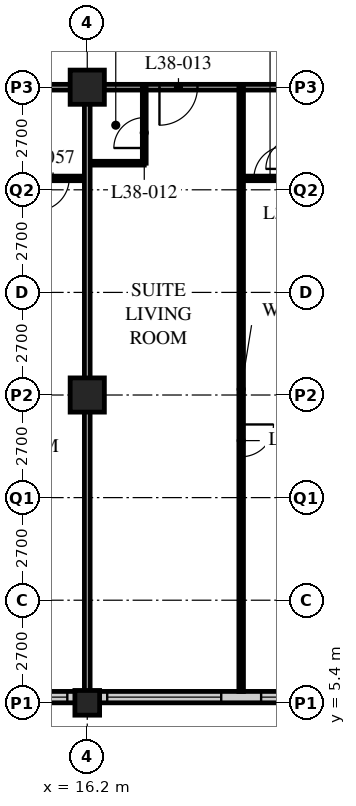
"""IFC4 building model, lengths in metres.
Left out: names, types, materials, properties, quantities, classifications, styles, units other than length and angle.
Written with IfcOpenShell. Run it as: python <this file> out.ifc"""

import sys

from ifc_helpers import new_model, si_unit, direction, frame, frame_2d, origin, origin_2d, place, context, subcontext, project, spatial, rectangle, hollow_rectangle, extrude, element, fill, save


model = new_model("IFC4")
c1 = context("Model", 3, precision=1e-05, world=origin(), true_north=direction((0.0, 1.0)))
c2 = subcontext(c1, "Body", "Model", "MODEL_VIEW")
j1 = project(units=[si_unit("LENGTHUNIT", "METRE"), si_unit("PLANEANGLEUNIT", "RADIAN")], contexts=[c1])
p1 = place(None, origin())
s1 = spatial("IfcSite", under=j1, at=p1, CompositionType="ELEMENT")
p2 = place(p1, origin())
s2 = spatial("IfcBuilding", under=s1, at=p2, CompositionType="ELEMENT")
p3 = place(p2, frame((0.0, 0.0, 147.6)))
s3 = spatial("IfcBuildingStorey", under=s2, at=p3, CompositionType="ELEMENT", Elevation=147.6)
p4 = place(p3, frame((16.2, 5.4, 0.0), z_axis=(0.0, 0.0, 1.0), x_axis=(1.0, 0.0, 0.0)))
e1 = element("IfcColumn", 1, at=p4, inside=s3, PredefinedType="COLUMN", context=c2, shape_type="SweptSolid", body=[
    extrude(hollow_rectangle(XDim=0.65, YDim=0.65, WallThickness=0.055, at=origin_2d()), origin(), (0.0, 0.0, 1.0), 3.4),
])
for number, where, z_axis, x_axis in (
    (2, (16.2, 13.5, 0.0), (0.0, 0.0, 1.0), (1.0, 0.0, 0.0)),
    (3, (16.2, 21.6, 0.0), (0.0, 0.0, 1.0), (1.0, 0.0, 0.0)),
):
    element("IfcColumn", number, at=place(p3, frame(where, z_axis=z_axis, x_axis=x_axis)), inside=s3, PredefinedType="COLUMN", context=c2, shape_type="SweptSolid", body=[
        extrude(hollow_rectangle(XDim=0.9, YDim=0.9, WallThickness=0.1, at=origin_2d()), origin(), (0.0, 0.0, 1.0), 3.4),
    ])
p5 = place(p3, frame((8.4, 5.55, 0.0), z_axis=(0.0, 0.0, 1.0), x_axis=(1.0, 0.0, 0.0)))
e4 = element("IfcWall", 4, at=p5, inside=s3, PredefinedType="SOLIDWALL", context=c2, shape_type="SweptSolid", body=[
    extrude(rectangle(XDim=40.2, YDim=0.3, at=frame_2d((20.1, 0.0))), origin(), (0.0, 0.0, 1.0), 3.19),
])
p6 = place(p5, frame((0.225, 0.0, 0.9)))
e5 = element("IfcOpeningElement", 5, at=p6, cuts=e4, PredefinedType="OPENING", context=c2, shape_type="SweptSolid", body=[
    extrude(rectangle(XDim=3.0, YDim=1.4, at=frame_2d((1.5, 0.7))), frame((0.0, 0.16, 0.0), z_axis=(0.0, -1.0, 0.0), x_axis=(1.0, 0.0, 0.0)), (0.0, 0.0, 1.0), 0.32),
])
p7 = place(p5, frame((4.275, 0.0, 0.9)))
e6 = element("IfcOpeningElement", 6, at=p7, cuts=e4, PredefinedType="OPENING", context=c2, shape_type="SweptSolid", body=[
    extrude(rectangle(XDim=3.0, YDim=1.4, at=frame_2d((1.5, 0.7))), frame((0.0, 0.16, 0.0), z_axis=(0.0, -1.0, 0.0), x_axis=(1.0, 0.0, 0.0)), (0.0, 0.0, 1.0), 0.32),
])
p8 = place(p5, frame((8.325, 0.0, 0.9)))
e7 = element("IfcOpeningElement", 7, at=p8, cuts=e4, PredefinedType="OPENING", context=c2, shape_type="SweptSolid", body=[
    extrude(rectangle(XDim=3.0, YDim=1.4, at=frame_2d((1.5, 0.7))), frame((0.0, 0.16, 0.0), z_axis=(0.0, -1.0, 0.0), x_axis=(1.0, 0.0, 0.0)), (0.0, 0.0, 1.0), 0.32),
])
p9 = place(p5, frame((12.375, 0.0, 0.9)))
e8 = element("IfcOpeningElement", 8, at=p9, cuts=e4, PredefinedType="OPENING", context=c2, shape_type="SweptSolid", body=[
    extrude(rectangle(XDim=3.0, YDim=1.4, at=frame_2d((1.5, 0.7))), frame((0.0, 0.16, 0.0), z_axis=(0.0, -1.0, 0.0), x_axis=(1.0, 0.0, 0.0)), (0.0, 0.0, 1.0), 0.32),
])
p10 = place(p5, frame((16.425, 0.0, 0.9)))
e9 = element("IfcOpeningElement", 9, at=p10, cuts=e4, PredefinedType="OPENING", context=c2, shape_type="SweptSolid", body=[
    extrude(rectangle(XDim=3.0, YDim=1.4, at=frame_2d((1.5, 0.7))), frame((0.0, 0.16, 0.0), z_axis=(0.0, -1.0, 0.0), x_axis=(1.0, 0.0, 0.0)), (0.0, 0.0, 1.0), 0.32),
])
p11 = place(p5, frame((20.475, 0.0, 0.9)))
e10 = element("IfcOpeningElement", 10, at=p11, cuts=e4, PredefinedType="OPENING", context=c2, shape_type="SweptSolid", body=[
    extrude(rectangle(XDim=3.0, YDim=1.4, at=frame_2d((1.5, 0.7))), frame((0.0, 0.16, 0.0), z_axis=(0.0, -1.0, 0.0), x_axis=(1.0, 0.0, 0.0)), (0.0, 0.0, 1.0), 0.32),
])
p12 = place(p5, frame((24.525, 0.0, 0.9)))
e11 = element("IfcOpeningElement", 11, at=p12, cuts=e4, PredefinedType="OPENING", context=c2, shape_type="SweptSolid", body=[
    extrude(rectangle(XDim=3.0, YDim=1.4, at=frame_2d((1.5, 0.7))), frame((0.0, 0.16, 0.0), z_axis=(0.0, -1.0, 0.0), x_axis=(1.0, 0.0, 0.0)), (0.0, 0.0, 1.0), 0.32),
])
p13 = place(p5, frame((28.575, 0.0, 0.9)))
e12 = element("IfcOpeningElement", 12, at=p13, cuts=e4, PredefinedType="OPENING", context=c2, shape_type="SweptSolid", body=[
    extrude(rectangle(XDim=3.0, YDim=1.4, at=frame_2d((1.5, 0.7))), frame((0.0, 0.16, 0.0), z_axis=(0.0, -1.0, 0.0), x_axis=(1.0, 0.0, 0.0)), (0.0, 0.0, 1.0), 0.32),
])
p14 = place(p5, frame((32.625, 0.0, 0.9)))
e13 = element("IfcOpeningElement", 13, at=p14, cuts=e4, PredefinedType="OPENING", context=c2, shape_type="SweptSolid", body=[
    extrude(rectangle(XDim=3.0, YDim=1.4, at=frame_2d((1.5, 0.7))), frame((0.0, 0.16, 0.0), z_axis=(0.0, -1.0, 0.0), x_axis=(1.0, 0.0, 0.0)), (0.0, 0.0, 1.0), 0.32),
])
p15 = place(p5, frame((36.675, 0.0, 0.9)))
e14 = element("IfcOpeningElement", 14, at=p15, cuts=e4, PredefinedType="OPENING", context=c2, shape_type="SweptSolid", body=[
    extrude(rectangle(XDim=3.0, YDim=1.4, at=frame_2d((1.5, 0.7))), frame((0.0, 0.16, 0.0), z_axis=(0.0, -1.0, 0.0), x_axis=(1.0, 0.0, 0.0)), (0.0, 0.0, 1.0), 0.32),
])
p16 = place(p3, frame((12.15, 21.6, 0.0), z_axis=(0.0, 0.0, 1.0), x_axis=(1.0, 0.0, 0.0)))
e15 = element("IfcWall", 15, at=p16, inside=s3, PredefinedType="PARTITIONING", context=c2, shape_type="SweptSolid", body=[
    extrude(rectangle(XDim=36.45, YDim=0.15, at=frame_2d((18.225, 0.0))), origin(), (0.0, 0.0, 1.0), 2.42),
])
p17 = place(p16, frame((5.95, 0.0, 0.0)))
e16 = element("IfcOpeningElement", 16, at=p17, cuts=e15, PredefinedType="OPENING", context=c2, shape_type="SweptSolid", body=[
    extrude(rectangle(XDim=1.0, YDim=2.1, at=frame_2d((0.5, 1.05))), frame((0.0, 0.085, 0.0), z_axis=(0.0, -1.0, 0.0), x_axis=(1.0, 0.0, 0.0)), (0.0, 0.0, 1.0), 0.17),
])
p18 = place(p16, frame((14.05, 0.0, 0.0)))
e17 = element("IfcOpeningElement", 17, at=p18, cuts=e15, PredefinedType="OPENING", context=c2, shape_type="SweptSolid", body=[
    extrude(rectangle(XDim=1.0, YDim=2.1, at=frame_2d((0.5, 1.05))), frame((0.0, 0.085, 0.0), z_axis=(0.0, -1.0, 0.0), x_axis=(1.0, 0.0, 0.0)), (0.0, 0.0, 1.0), 0.17),
])
p19 = place(p16, frame((22.15, 0.0, 0.0)))
e18 = element("IfcOpeningElement", 18, at=p19, cuts=e15, PredefinedType="OPENING", context=c2, shape_type="SweptSolid", body=[
    extrude(rectangle(XDim=1.0, YDim=2.1, at=frame_2d((0.5, 1.05))), frame((0.0, 0.085, 0.0), z_axis=(0.0, -1.0, 0.0), x_axis=(1.0, 0.0, 0.0)), (0.0, 0.0, 1.0), 0.17),
])
p20 = place(p16, frame((30.8, 0.0, 0.0)))
e19 = element("IfcOpeningElement", 19, at=p20, cuts=e15, PredefinedType="OPENING", context=c2, shape_type="SweptSolid", body=[
    extrude(rectangle(XDim=1.0, YDim=2.1, at=frame_2d((0.5, 1.05))), frame((0.0, 0.085, 0.0), z_axis=(0.0, -1.0, 0.0), x_axis=(1.0, 0.0, 0.0)), (0.0, 0.0, 1.0), 0.17),
])
p21 = place(p16, frame((1.525, 0.0, 0.0)))
e20 = element("IfcOpeningElement", 20, at=p21, cuts=e15, PredefinedType="OPENING", context=c2, shape_type="SweptSolid", body=[
    extrude(rectangle(XDim=1.0, YDim=2.1, at=frame_2d((0.5, 1.05))), frame((0.0, 0.085, 0.0), z_axis=(0.0, -1.0, 0.0), x_axis=(1.0, 0.0, 0.0)), (0.0, 0.0, 1.0), 0.17),
])
p22 = place(p16, frame((33.925, 0.0, 0.0)))
e21 = element("IfcOpeningElement", 21, at=p22, cuts=e15, PredefinedType="OPENING", context=c2, shape_type="SweptSolid", body=[
    extrude(rectangle(XDim=1.0, YDim=2.1, at=frame_2d((0.5, 1.05))), frame((0.0, 0.085, 0.0), z_axis=(0.0, -1.0, 0.0), x_axis=(1.0, 0.0, 0.0)), (0.0, 0.0, 1.0), 0.17),
])
p23 = place(p3, frame((16.2, 19.6, 0.0), z_axis=(0.0, 0.0, 1.0), x_axis=(1.0, 0.0, 0.0)))
e22 = element("IfcWall", 22, at=p23, inside=s3, PredefinedType="PARTITIONING", context=c2, shape_type="SweptSolid", body=[
    extrude(rectangle(XDim=1.5, YDim=0.1, at=frame_2d((0.75, 0.0))), origin(), (0.0, 0.0, 1.0), 3.19),
])
p24 = place(p3, frame((17.7, 21.6, 0.0), z_axis=(0.0, 0.0, 1.0), x_axis=(0.0, -1.0, 0.0)))
e23 = element("IfcWall", 23, at=p24, inside=s3, PredefinedType="PARTITIONING", context=c2, shape_type="SweptSolid", body=[
    extrude(rectangle(XDim=2.0, YDim=0.1, at=frame_2d((1.0, 0.0))), origin(), (0.0, 0.0, 1.0), 3.19),
])
p25 = place(p24, frame((0.8, 0.0, 0.0)))
e24 = element("IfcOpeningElement", 24, at=p25, cuts=e23, PredefinedType="OPENING", context=c2, shape_type="SweptSolid", body=[
    extrude(rectangle(XDim=0.8, YDim=2.1, at=frame_2d((0.4, 1.05))), frame((0.0, 0.06, 0.0), z_axis=(0.0, -1.0, 0.0), x_axis=(1.0, 0.0, 0.0)), (0.0, 0.0, 1.0), 0.12),
])
p26 = place(p3, frame((20.25, 21.6, 0.0), z_axis=(0.0, 0.0, 1.0), x_axis=(0.0, -1.0, 0.0)))
e25 = element("IfcWall", 25, at=p26, inside=s3, PredefinedType="PARTITIONING", context=c2, shape_type="SweptSolid", body=[
    extrude(rectangle(XDim=15.9, YDim=0.12, at=frame_2d((7.95, 0.0))), origin(), (0.0, 0.0, 1.0), 3.19),
])
p27 = place(p26, frame((8.875, 0.0, 0.0)))
e26 = element("IfcOpeningElement", 26, at=p27, cuts=e25, PredefinedType="OPENING", context=c2, shape_type="SweptSolid", body=[
    extrude(rectangle(XDim=0.85, YDim=2.1, at=frame_2d((0.425, 1.05))), frame((0.0, 0.07, 0.0), z_axis=(0.0, -1.0, 0.0), x_axis=(1.0, 0.0, 0.0)), (0.0, 0.0, 1.0), 0.14),
])
p28 = place(p3, frame((8.15, 19.2, 0.0), z_axis=(0.0, 0.0, 1.0), x_axis=(1.0, 0.0, 0.0)))
e27 = element("IfcWall", 27, at=p28, inside=s3, PredefinedType="PARTITIONING", context=c2, shape_type="SweptSolid", body=[
    extrude(rectangle(XDim=8.05, YDim=0.12, at=frame_2d((4.025, 0.0))), origin(), (0.0, 0.0, 1.0), 3.19),
])
p29 = place(p28, frame((6.725, 0.0, 0.0)))
e28 = element("IfcOpeningElement", 28, at=p29, cuts=e27, PredefinedType="OPENING", context=c2, shape_type="SweptSolid", body=[
    extrude(rectangle(XDim=0.85, YDim=2.1, at=frame_2d((0.425, 1.05))), frame((0.0, 0.07, 0.0), z_axis=(0.0, -1.0, 0.0), x_axis=(1.0, 0.0, 0.0)), (0.0, 0.0, 1.0), 0.14),
])
p30 = place(p28, frame((2.875, 0.0, 0.0)))
e29 = element("IfcOpeningElement", 29, at=p30, cuts=e27, PredefinedType="OPENING", context=c2, shape_type="SweptSolid", body=[
    extrude(rectangle(XDim=0.85, YDim=2.1, at=frame_2d((0.425, 1.05))), frame((0.0, 0.07, 0.0), z_axis=(0.0, -1.0, 0.0), x_axis=(1.0, 0.0, 0.0)), (0.0, 0.0, 1.0), 0.14),
])
p31 = place(p3, frame((16.2, 21.6, 0.0), z_axis=(0.0, 0.0, 1.0), x_axis=(0.0, -1.0, 0.0)))
e30 = element("IfcWall", 30, at=p31, inside=s3, PredefinedType="PARTITIONING", context=c2, shape_type="SweptSolid", body=[
    extrude(rectangle(XDim=15.9, YDim=0.15, at=frame_2d((7.95, 0.0))), origin(), (0.0, 0.0, 1.0), 2.42),
])
p32 = place(p3, frame((21.71, 19.2, 0.0), z_axis=(0.0, 0.0, 1.0), x_axis=(-1.0, 0.0, 0.0)))
e31 = element("IfcWall", 31, at=p32, inside=s3, PredefinedType="PARTITIONING", context=c2, shape_type="SweptSolid", body=[
    extrude(rectangle(XDim=1.46, YDim=0.12, at=frame_2d((0.73, 0.0))), origin(), (0.0, 0.0, 1.0), 3.19),
])
p33 = place(p32, frame((0.275, 0.0, 0.0)))
e32 = element("IfcOpeningElement", 32, at=p33, cuts=e31, PredefinedType="OPENING", context=c2, shape_type="SweptSolid", body=[
    extrude(rectangle(XDim=0.85, YDim=2.1, at=frame_2d((0.425, 1.05))), frame((0.0, 0.07, 0.0), z_axis=(0.0, -1.0, 0.0), x_axis=(1.0, 0.0, 0.0)), (0.0, 0.0, 1.0), 0.14),
])
p34 = place(p7, origin())
e33 = element("IfcWindow", 33, at=p34, inside=s3, PartitioningType="SINGLE_PANEL", PredefinedType="WINDOW", context=c2, shape_type="SweptSolid", body=[
    extrude(rectangle(XDim=3.0, YDim=1.4, at=frame_2d((1.5, 0.7))), frame((0.0, 0.03, 0.0), z_axis=(0.0, -1.0, 0.0), x_axis=(1.0, 0.0, 0.0)), (0.0, 0.0, 1.0), 0.06),
])
fill(e6, e33)
p35 = place(p8, origin())
e34 = element("IfcWindow", 34, at=p35, inside=s3, PartitioningType="SINGLE_PANEL", PredefinedType="WINDOW", context=c2, shape_type="SweptSolid", body=[
    extrude(rectangle(XDim=3.0, YDim=1.4, at=frame_2d((1.5, 0.7))), frame((0.0, 0.03, 0.0), z_axis=(0.0, -1.0, 0.0), x_axis=(1.0, 0.0, 0.0)), (0.0, 0.0, 1.0), 0.06),
])
fill(e7, e34)
p36 = place(p9, origin())
e35 = element("IfcWindow", 35, at=p36, inside=s3, PartitioningType="SINGLE_PANEL", PredefinedType="WINDOW", context=c2, shape_type="SweptSolid", body=[
    extrude(rectangle(XDim=3.0, YDim=1.4, at=frame_2d((1.5, 0.7))), frame((0.0, 0.03, 0.0), z_axis=(0.0, -1.0, 0.0), x_axis=(1.0, 0.0, 0.0)), (0.0, 0.0, 1.0), 0.06),
])
fill(e8, e35)
p37 = place(p25, origin())
e36 = element("IfcDoor", 36, at=p37, inside=s3, OperationType="SINGLE_SWING_LEFT", PredefinedType="DOOR", context=c2, shape_type="SweptSolid", body=[
    extrude(rectangle(XDim=0.8, YDim=2.1, at=frame_2d((0.4, 1.05))), frame((0.0, 0.025, 0.0), z_axis=(0.0, -1.0, 0.0), x_axis=(1.0, 0.0, 0.0)), (0.0, 0.0, 1.0), 0.05),
])
fill(e24, e36)
p38 = place(p17, origin())
e37 = element("IfcDoor", 37, at=p38, inside=s3, OperationType="SINGLE_SWING_RIGHT", PredefinedType="DOOR", context=c2, shape_type="SweptSolid", body=[
    extrude(rectangle(XDim=1.0, YDim=2.1, at=frame_2d((0.5, 1.05))), frame((0.0, 0.025, 0.0), z_axis=(0.0, -1.0, 0.0), x_axis=(1.0, 0.0, 0.0)), (0.0, 0.0, 1.0), 0.05),
])
fill(e16, e37)
p39 = place(p27, origin())
e38 = element("IfcDoor", 38, at=p39, inside=s3, OperationType="SINGLE_SWING_LEFT", PredefinedType="DOOR", context=c2, shape_type="SweptSolid", body=[
    extrude(rectangle(XDim=0.85, YDim=2.1, at=frame_2d((0.425, 1.05))), frame((0.0, 0.025, 0.0), z_axis=(0.0, -1.0, 0.0), x_axis=(1.0, 0.0, 0.0)), (0.0, 0.0, 1.0), 0.05),
])
fill(e26, e38)
p40 = place(p29, origin())
e39 = element("IfcDoor", 39, at=p40, inside=s3, OperationType="SINGLE_SWING_RIGHT", PredefinedType="DOOR", context=c2, shape_type="SweptSolid", body=[
    extrude(rectangle(XDim=0.85, YDim=2.1, at=frame_2d((0.425, 1.05))), frame((0.0, 0.025, 0.0), z_axis=(0.0, -1.0, 0.0), x_axis=(1.0, 0.0, 0.0)), (0.0, 0.0, 1.0), 0.05),
])
fill(e28, e39)
p41 = place(p33, origin())
e40 = element("IfcDoor", 40, at=p41, inside=s3, OperationType="SINGLE_SWING_RIGHT", PredefinedType="DOOR", context=c2, shape_type="SweptSolid", body=[
    extrude(rectangle(XDim=0.85, YDim=2.1, at=frame_2d((0.425, 1.05))), frame((0.0, 0.025, 0.0), z_axis=(0.0, -1.0, 0.0), x_axis=(1.0, 0.0, 0.0)), (0.0, 0.0, 1.0), 0.05),
])
fill(e32, e40)
save(model, sys.argv[1])
